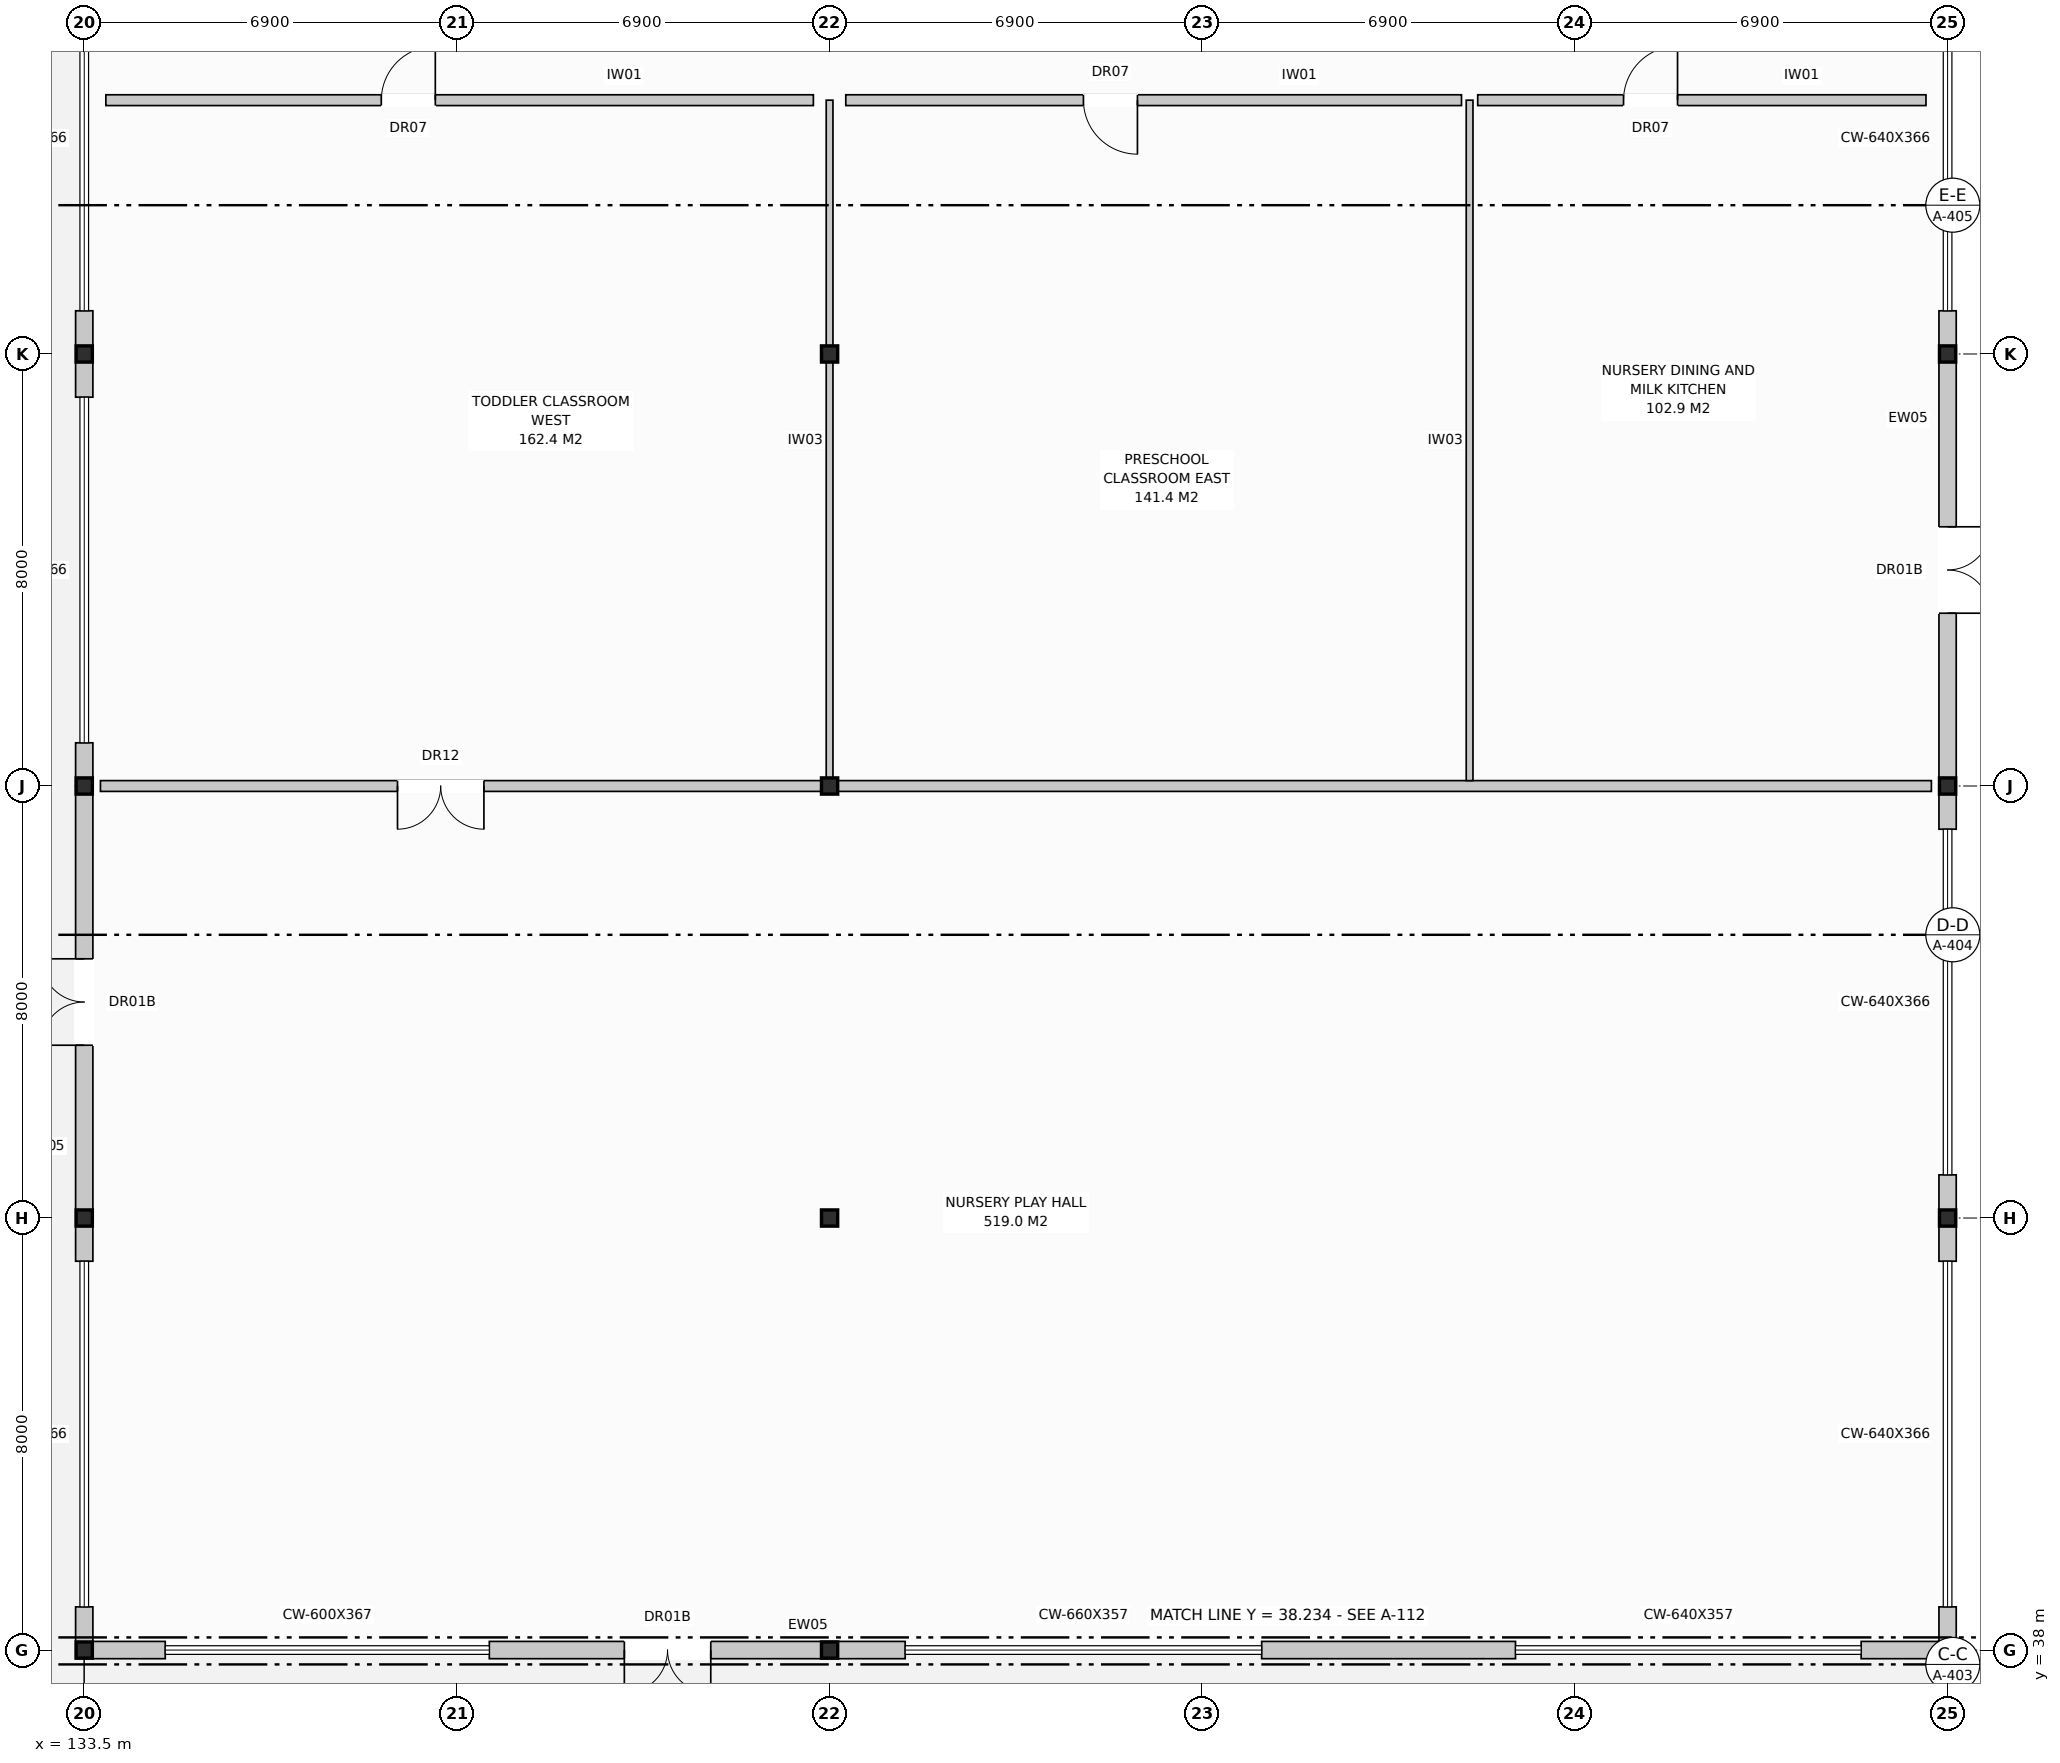
"""IFC4 building model, lengths in metres.
Left out: names, types, materials, properties, quantities, classifications, styles, units other than length and angle.
Written with IfcOpenShell. Run it as: python <this file> out.ifc"""

import sys

from ifc_helpers import new_model, si_unit, direction, frame, frame_2d, origin, origin_with_axes, origin_2d, place, context, subcontext, project, spatial, rectangle, i_section, extrude, element, fill, save


model = new_model("IFC4")
c1 = context("Model", 3, precision=1e-05, world=origin(), true_north=direction((0.0, 1.0)))
c2 = subcontext(c1, "Body", "Model", "MODEL_VIEW")
j1 = project(units=[si_unit("LENGTHUNIT", "METRE"), si_unit("PLANEANGLEUNIT", "RADIAN")], contexts=[c1])
p1 = place(None, origin())
s1 = spatial("IfcSite", under=j1, at=p1, CompositionType="ELEMENT")
p2 = place(p1, origin())
s2 = spatial("IfcBuilding", under=s1, at=p2, CompositionType="ELEMENT")
p3 = place(p2, origin())
s3 = spatial("IfcBuildingStorey", under=s2, at=p3, CompositionType="ELEMENT", Elevation=0.0)
for number, where, z_axis, x_axis in (
    (1, (133.5, 38.0, 0.0), (0.0, 0.0, 1.0), (1.0, 0.0, 0.0)),
    (2, (133.5, 46.0, 0.0), (0.0, 0.0, 1.0), (1.0, 0.0, 0.0)),
    (3, (133.5, 54.0, 0.0), (0.0, 0.0, 1.0), (1.0, 0.0, 0.0)),
    (4, (133.5, 62.0, 0.0), (0.0, 0.0, 1.0), (1.0, 0.0, 0.0)),
    (5, (147.3, 38.0, 0.0), (0.0, 0.0, 1.0), (1.0, 0.0, 0.0)),
    (6, (147.3, 46.0, 0.0), (0.0, 0.0, 1.0), (1.0, 0.0, 0.0)),
    (7, (147.3, 54.0, 0.0), (0.0, 0.0, 1.0), (1.0, 0.0, 0.0)),
    (8, (147.3, 62.0, 0.0), (0.0, 0.0, 1.0), (1.0, 0.0, 0.0)),
    (9, (168.0, 38.0, 0.0), (0.0, 0.0, 1.0), (1.0, 0.0, 0.0)),
    (10, (168.0, 46.0, 0.0), (0.0, 0.0, 1.0), (1.0, 0.0, 0.0)),
    (11, (168.0, 54.0, 0.0), (0.0, 0.0, 1.0), (1.0, 0.0, 0.0)),
    (12, (168.0, 62.0, 0.0), (0.0, 0.0, 1.0), (1.0, 0.0, 0.0)),
):
    element("IfcColumn", number, at=place(p3, frame(where, z_axis=z_axis, x_axis=x_axis)), inside=s3, PredefinedType="COLUMN", context=c2, shape_type="SweptSolid", body=[
        extrude(i_section(OverallWidth=0.3, OverallDepth=0.3, WebThickness=0.011, FlangeThickness=0.019, at=origin_2d()), origin(), (0.0, 0.0, 1.0), 4.4),
    ])
p4 = place(p3, frame((133.5, 37.84, 0.0), z_axis=(0.0, 0.0, 1.0), x_axis=(0.0, 1.0, 0.0)))
e13 = element("IfcWall", 13, at=p4, inside=s3, PredefinedType="STANDARD", context=c2, shape_type="SweptSolid", body=[
    extrude(rectangle(XDim=0.96, YDim=0.32, at=frame_2d((0.48, 0.0))), origin(), (0.0, 0.0, 1.0), 3.66),
])
p5 = place(p3, frame((133.5, 45.2, 0.0), z_axis=(0.0, 0.0, 1.0), x_axis=(0.0, 1.0, 0.0)))
e14 = element("IfcWall", 14, at=p5, inside=s3, PredefinedType="STANDARD", context=c2, shape_type="SweptSolid", body=[
    extrude(rectangle(XDim=8.8, YDim=0.32, at=frame_2d((4.4, 0.0))), origin(), (0.0, 0.0, 1.0), 3.66),
])
p6 = place(p5, frame((4.0, 0.0, 0.0)))
e15 = element("IfcOpeningElement", 15, at=p6, cuts=e14, PredefinedType="OPENING", context=c2, shape_type="SweptSolid", body=[
    extrude(rectangle(XDim=1.6, YDim=2.3, at=frame_2d((0.8, 1.15))), frame((0.0, 0.172, 0.0), z_axis=(0.0, -1.0, 0.0), x_axis=(1.0, 0.0, 0.0)), (0.0, 0.0, 1.0), 0.344),
])
p7 = place(p3, frame((133.5, 54.0, 0.0), z_axis=(0.0, 0.0, 1.0), x_axis=(0.0, 1.0, 0.0)))
e16 = element("IfcWall", 16, at=p7, inside=s3, PredefinedType="STANDARD", context=c2, shape_type="SweptSolid", body=[
    extrude(rectangle(XDim=0.8, YDim=0.32, at=frame_2d((0.4, 0.0))), origin(), (0.0, 0.0, 1.0), 3.66),
])
p8 = place(p3, frame((133.5, 61.2, 0.0), z_axis=(0.0, 0.0, 1.0), x_axis=(0.0, 1.0, 0.0)))
e17 = element("IfcWall", 17, at=p8, inside=s3, PredefinedType="STANDARD", context=c2, shape_type="SweptSolid", body=[
    extrude(rectangle(XDim=1.6, YDim=0.32, at=frame_2d((0.8, 0.0))), origin(), (0.0, 0.0, 1.0), 3.66),
])
p9 = place(p3, frame((168.0, 37.84, 0.0), z_axis=(0.0, 0.0, 1.0), x_axis=(0.0, 1.0, 0.0)))
e18 = element("IfcWall", 18, at=p9, inside=s3, PredefinedType="STANDARD", context=c2, shape_type="SweptSolid", body=[
    extrude(rectangle(XDim=0.96, YDim=0.32, at=frame_2d((0.48, 0.0))), origin(), (0.0, 0.0, 1.0), 3.66),
])
p10 = place(p3, frame((168.0, 45.2, 0.0), z_axis=(0.0, 0.0, 1.0), x_axis=(0.0, 1.0, 0.0)))
e19 = element("IfcWall", 19, at=p10, inside=s3, PredefinedType="STANDARD", context=c2, shape_type="SweptSolid", body=[
    extrude(rectangle(XDim=1.6, YDim=0.32, at=frame_2d((0.8, 0.0))), origin(), (0.0, 0.0, 1.0), 3.66),
])
p11 = place(p3, frame((168.0, 53.2, 0.0), z_axis=(0.0, 0.0, 1.0), x_axis=(0.0, 1.0, 0.0)))
e20 = element("IfcWall", 20, at=p11, inside=s3, PredefinedType="STANDARD", context=c2, shape_type="SweptSolid", body=[
    extrude(rectangle(XDim=0.8, YDim=0.32, at=frame_2d((0.4, 0.0))), origin(), (0.0, 0.0, 1.0), 3.66),
])
p12 = place(p3, frame((168.0, 54.0, 0.0), z_axis=(0.0, 0.0, 1.0), x_axis=(0.0, 1.0, 0.0)))
e21 = element("IfcWall", 21, at=p12, inside=s3, PredefinedType="STANDARD", context=c2, shape_type="SweptSolid", body=[
    extrude(rectangle(XDim=8.8, YDim=0.32, at=frame_2d((4.4, 0.0))), origin(), (0.0, 0.0, 1.0), 3.66),
])
p13 = place(p12, frame((3.2, 0.0, 0.0)))
e22 = element("IfcOpeningElement", 22, at=p13, cuts=e21, PredefinedType="OPENING", context=c2, shape_type="SweptSolid", body=[
    extrude(rectangle(XDim=1.6, YDim=2.3, at=frame_2d((0.8, 1.15))), frame((0.0, 0.172, 0.0), z_axis=(0.0, -1.0, 0.0), x_axis=(1.0, 0.0, 0.0)), (0.0, 0.0, 1.0), 0.344),
])
p14 = place(p3, frame((133.65, 38.0, 0.0), z_axis=(0.0, 0.0, 1.0), x_axis=(1.0, 0.0, 0.0)))
e23 = element("IfcWall", 23, at=p14, inside=s3, PredefinedType="STANDARD", context=c2, shape_type="SweptSolid", body=[
    extrude(rectangle(XDim=1.35, YDim=0.32, at=frame_2d((0.675, 0.0))), origin(), (0.0, 0.0, 1.0), 3.67),
])
p15 = place(p3, frame((141.0, 38.0, 0.0), z_axis=(0.0, 0.0, 1.0), x_axis=(1.0, 0.0, 0.0)))
e24 = element("IfcWall", 24, at=p15, inside=s3, PredefinedType="STANDARD", context=c2, shape_type="SweptSolid", body=[
    extrude(rectangle(XDim=7.7, YDim=0.32, at=frame_2d((3.85, 0.0))), origin(), (0.0, 0.0, 1.0), 3.57),
])
p16 = place(p15, frame((2.5, 0.0, 0.0)))
e25 = element("IfcOpeningElement", 25, at=p16, cuts=e24, PredefinedType="OPENING", context=c2, shape_type="SweptSolid", body=[
    extrude(rectangle(XDim=1.6, YDim=2.3, at=frame_2d((0.8, 1.15))), frame((0.0, 0.172, 0.0), z_axis=(0.0, -1.0, 0.0), x_axis=(1.0, 0.0, 0.0)), (0.0, 0.0, 1.0), 0.344),
])
p17 = place(p3, frame((155.3, 38.0, 0.0), z_axis=(0.0, 0.0, 1.0), x_axis=(1.0, 0.0, 0.0)))
e26 = element("IfcWall", 26, at=p17, inside=s3, PredefinedType="STANDARD", context=c2, shape_type="SweptSolid", body=[
    extrude(rectangle(XDim=4.7, YDim=0.32, at=frame_2d((2.35, 0.0))), origin(), (0.0, 0.0, 1.0), 3.57),
])
p18 = place(p3, frame((166.4, 38.0, 0.0), z_axis=(0.0, 0.0, 1.0), x_axis=(1.0, 0.0, 0.0)))
e27 = element("IfcWall", 27, at=p18, inside=s3, PredefinedType="STANDARD", context=c2, shape_type="SweptSolid", body=[
    extrude(rectangle(XDim=1.45, YDim=0.32, at=frame_2d((0.725, 0.0))), origin(), (0.0, 0.0, 1.0), 3.57),
])
p19 = place(p3, frame((133.9, 66.7, 0.0), z_axis=(0.0, 0.0, 1.0), x_axis=(1.0, 0.0, 0.0)))
e28 = element("IfcWall", 28, at=p19, inside=s3, PredefinedType="PARTITIONING", context=c2, shape_type="SweptSolid", body=[
    extrude(rectangle(XDim=13.1, YDim=0.2, at=frame_2d((6.55, 0.0))), origin(), (0.0, 0.0, 1.0), 4.12),
])
p20 = place(p19, frame((5.1, 0.0, 0.0)))
e29 = element("IfcOpeningElement", 29, at=p20, cuts=e28, PredefinedType="OPENING", context=c2, shape_type="SweptSolid", body=[
    extrude(rectangle(XDim=1.0, YDim=2.15, at=frame_2d((0.5, 1.075))), frame((0.0, 0.112, 0.0), z_axis=(0.0, -1.0, 0.0), x_axis=(1.0, 0.0, 0.0)), (0.0, 0.0, 1.0), 0.224),
])
p21 = place(p3, frame((147.6, 66.7, 0.0), z_axis=(0.0, 0.0, 1.0), x_axis=(1.0, 0.0, 0.0)))
e30 = element("IfcWall", 30, at=p21, inside=s3, PredefinedType="PARTITIONING", context=c2, shape_type="SweptSolid", body=[
    extrude(rectangle(XDim=11.4, YDim=0.2, at=frame_2d((5.7, 0.0))), origin(), (0.0, 0.0, 1.0), 4.12),
])
p22 = place(p21, frame((4.4, 0.0, 0.0)))
e31 = element("IfcOpeningElement", 31, at=p22, cuts=e30, PredefinedType="OPENING", context=c2, shape_type="SweptSolid", body=[
    extrude(rectangle(XDim=1.0, YDim=2.15, at=frame_2d((0.5, 1.075))), frame((0.0, 0.112, 0.0), z_axis=(0.0, -1.0, 0.0), x_axis=(1.0, 0.0, 0.0)), (0.0, 0.0, 1.0), 0.224),
])
p23 = place(p3, frame((159.3, 66.7, 0.0), z_axis=(0.0, 0.0, 1.0), x_axis=(1.0, 0.0, 0.0)))
e32 = element("IfcWall", 32, at=p23, inside=s3, PredefinedType="PARTITIONING", context=c2, shape_type="SweptSolid", body=[
    extrude(rectangle(XDim=8.3, YDim=0.2, at=frame_2d((4.15, 0.0))), origin(), (0.0, 0.0, 1.0), 4.12),
])
p24 = place(p23, frame((2.7, 0.0, 0.0)))
e33 = element("IfcOpeningElement", 33, at=p24, cuts=e32, PredefinedType="OPENING", context=c2, shape_type="SweptSolid", body=[
    extrude(rectangle(XDim=1.0, YDim=2.15, at=frame_2d((0.5, 1.075))), frame((0.0, 0.112, 0.0), z_axis=(0.0, -1.0, 0.0), x_axis=(1.0, 0.0, 0.0)), (0.0, 0.0, 1.0), 0.224),
])
p25 = place(p3, frame((133.8, 54.0, 0.0), z_axis=(0.0, 0.0, 1.0), x_axis=(1.0, 0.0, 0.0)))
e34 = element("IfcWall", 34, at=p25, inside=s3, PredefinedType="PARTITIONING", context=c2, shape_type="SweptSolid", body=[
    extrude(rectangle(XDim=33.9, YDim=0.2, at=frame_2d((16.95, 0.0))), origin(), (0.0, 0.0, 1.0), 3.57),
])
p26 = place(p25, frame((5.5, 0.0, 0.0)))
e35 = element("IfcOpeningElement", 35, at=p26, cuts=e34, PredefinedType="OPENING", context=c2, shape_type="SweptSolid", body=[
    extrude(rectangle(XDim=1.6, YDim=2.2, at=frame_2d((0.8, 1.1))), frame((0.0, 0.112, 0.0), z_axis=(0.0, -1.0, 0.0), x_axis=(1.0, 0.0, 0.0)), (0.0, 0.0, 1.0), 0.224),
])
p27 = place(p3, frame((147.3, 54.1, 0.0), z_axis=(0.0, 0.0, 1.0), x_axis=(0.0, 1.0, 0.0)))
e36 = element("IfcWall", 36, at=p27, inside=s3, PredefinedType="PARTITIONING", context=c2, shape_type="SweptSolid", body=[
    extrude(rectangle(XDim=12.6, YDim=0.125, at=frame_2d((6.3, 0.0))), origin(), (0.0, 0.0, 1.0), 3.66),
])
p28 = place(p3, frame((159.15, 54.1, 0.0), z_axis=(0.0, 0.0, 1.0), x_axis=(0.0, 1.0, 0.0)))
e37 = element("IfcWall", 37, at=p28, inside=s3, PredefinedType="PARTITIONING", context=c2, shape_type="SweptSolid", body=[
    extrude(rectangle(XDim=12.6, YDim=0.125, at=frame_2d((6.3, 0.0))), origin(), (0.0, 0.0, 1.0), 4.12),
])
p29 = place(p6, origin_with_axes())
e38 = element("IfcDoor", 38, at=p29, inside=s3, OperationType="DOUBLE_DOOR_SINGLE_SWING", PredefinedType="DOOR", context=c2, shape_type="SweptSolid", body=[
    extrude(rectangle(XDim=1.6, YDim=2.3, at=frame_2d((0.8, 1.15))), frame((0.0, 0.025, 0.0), z_axis=(0.0, -1.0, 0.0), x_axis=(1.0, 0.0, 0.0)), (0.0, 0.0, 1.0), 0.05),
])
fill(e15, e38)
p30 = place(p13, frame((1.6, 0.0, 0.0), z_axis=(0.0, 0.0, 1.0), x_axis=(-1.0, 0.0, 0.0)))
e39 = element("IfcDoor", 39, at=p30, inside=s3, OperationType="DOUBLE_DOOR_SINGLE_SWING", PredefinedType="DOOR", context=c2, shape_type="SweptSolid", body=[
    extrude(rectangle(XDim=1.6, YDim=2.3, at=frame_2d((0.8, 1.15))), frame((0.0, 0.025, 0.0), z_axis=(0.0, -1.0, 0.0), x_axis=(1.0, 0.0, 0.0)), (0.0, 0.0, 1.0), 0.05),
])
fill(e22, e39)
p31 = place(p16, frame((1.6, 0.0, 0.0), z_axis=(0.0, 0.0, 1.0), x_axis=(-1.0, 0.0, 0.0)))
e40 = element("IfcDoor", 40, at=p31, inside=s3, OperationType="DOUBLE_DOOR_SINGLE_SWING", PredefinedType="DOOR", context=c2, shape_type="SweptSolid", body=[
    extrude(rectangle(XDim=1.6, YDim=2.3, at=frame_2d((0.8, 1.15))), frame((0.0, 0.025, 0.0), z_axis=(0.0, -1.0, 0.0), x_axis=(1.0, 0.0, 0.0)), (0.0, 0.0, 1.0), 0.05),
])
fill(e25, e40)
p32 = place(p20, origin_with_axes())
e41 = element("IfcDoor", 41, at=p32, inside=s3, OperationType="SINGLE_SWING_RIGHT", PredefinedType="DOOR", context=c2, shape_type="SweptSolid", body=[
    extrude(rectangle(XDim=1.0, YDim=2.15, at=frame_2d((0.5, 1.075))), frame((0.0, 0.025, 0.0), z_axis=(0.0, -1.0, 0.0), x_axis=(1.0, 0.0, 0.0)), (0.0, 0.0, 1.0), 0.05),
])
fill(e29, e41)
p33 = place(p22, frame((1.0, 0.0, 0.0), z_axis=(0.0, 0.0, 1.0), x_axis=(-1.0, 0.0, 0.0)))
e42 = element("IfcDoor", 42, at=p33, inside=s3, OperationType="SINGLE_SWING_RIGHT", PredefinedType="DOOR", context=c2, shape_type="SweptSolid", body=[
    extrude(rectangle(XDim=1.0, YDim=2.15, at=frame_2d((0.5, 1.075))), frame((0.0, 0.025, 0.0), z_axis=(0.0, -1.0, 0.0), x_axis=(1.0, 0.0, 0.0)), (0.0, 0.0, 1.0), 0.05),
])
fill(e31, e42)
p34 = place(p24, origin_with_axes())
e43 = element("IfcDoor", 43, at=p34, inside=s3, OperationType="SINGLE_SWING_RIGHT", PredefinedType="DOOR", context=c2, shape_type="SweptSolid", body=[
    extrude(rectangle(XDim=1.0, YDim=2.15, at=frame_2d((0.5, 1.075))), frame((0.0, 0.025, 0.0), z_axis=(0.0, -1.0, 0.0), x_axis=(1.0, 0.0, 0.0)), (0.0, 0.0, 1.0), 0.05),
])
fill(e33, e43)
p35 = place(p26, frame((1.6, 0.0, 0.0), z_axis=(0.0, 0.0, 1.0), x_axis=(-1.0, 0.0, 0.0)))
e44 = element("IfcDoor", 44, at=p35, inside=s3, OperationType="DOUBLE_DOOR_SINGLE_SWING", PredefinedType="DOOR", context=c2, shape_type="SweptSolid", body=[
    extrude(rectangle(XDim=1.6, YDim=2.2, at=frame_2d((0.8, 1.1))), frame((0.0, 0.025, 0.0), z_axis=(0.0, -1.0, 0.0), x_axis=(1.0, 0.0, 0.0)), (0.0, 0.0, 1.0), 0.05),
])
fill(e35, e44)
save(model, sys.argv[1])
